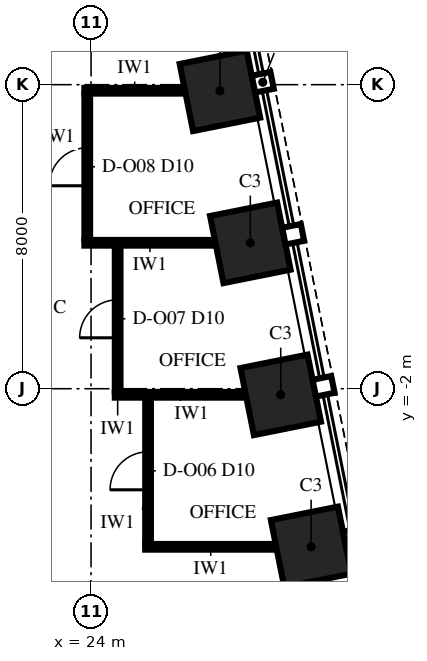
"""IFC4 building model, lengths in metres.
Left out: names, types, materials, properties, quantities, classifications, styles, units other than length and angle.
Written with IfcOpenShell. Run it as: python <this file> out.ifc"""

import sys

from ifc_helpers import new_model, si_unit, direction, frame, frame_2d, origin, origin_2d, place, context, subcontext, project, spatial, rectangle, extrude, element, fill, save


model = new_model("IFC4")
c1 = context("Model", 3, precision=1e-05, world=origin(), true_north=direction((0.0, 1.0)))
c2 = subcontext(c1, "Body", "Model", "MODEL_VIEW")
j1 = project(units=[si_unit("LENGTHUNIT", "METRE"), si_unit("PLANEANGLEUNIT", "RADIAN")], contexts=[c1])
p1 = place(None, origin())
s1 = spatial("IfcSite", under=j1, at=p1, CompositionType="ELEMENT")
p2 = place(p1, origin())
s2 = spatial("IfcBuilding", under=s1, at=p2, CompositionType="ELEMENT")
p3 = place(p2, frame((0.0, 0.0, 163.0)))
s3 = spatial("IfcBuildingStorey", under=s2, at=p3, CompositionType="ELEMENT", Elevation=163.0)
for number, where, z_axis, x_axis in (
    (1, (29.791, -6.162, 0.0), (0.0, 0.0, 1.0), (-0.196, 0.981, 0.0)),
    (2, (28.991, -2.162, 0.0), (0.0, 0.0, 1.0), (-0.196, 0.981, 0.0)),
    (3, (28.191, 1.838, 0.0), (0.0, 0.0, 1.0), (-0.196, 0.981, 0.0)),
    (4, (27.391, 5.838, 0.0), (0.0, 0.0, 1.0), (-0.196, 0.981, 0.0)),
):
    element("IfcColumn", number, at=place(p3, frame(where, z_axis=z_axis, x_axis=x_axis)), inside=s3, PredefinedType="COLUMN", context=c2, shape_type="SweptSolid", body=[
        extrude(rectangle(XDim=1.8, YDim=1.8, at=origin_2d()), origin(), (0.0, 0.0, 1.0), 4.0),
    ])
p4 = place(p3, frame((25.425, -6.16, 0.0), z_axis=(0.0, 0.0, 1.0), x_axis=(1.0, 0.0, 0.0)))
e5 = element("IfcWall", 5, at=p4, inside=s3, PredefinedType="PARTITIONING", context=c2, shape_type="SweptSolid", body=[
    extrude(rectangle(XDim=3.448, YDim=0.15, at=frame_2d((1.724, 0.0))), origin(), (0.0, 0.0, 1.0), 2.742),
])
for number, where, z_axis, x_axis in (
    (6, (24.625, -2.16, 0.0), (0.0, 0.0, 1.0), (1.0, 0.0, 0.0)),
    (7, (23.825, 1.84, 0.0), (0.0, 0.0, 1.0), (1.0, 0.0, 0.0)),
):
    element("IfcWall", number, at=place(p3, frame(where, z_axis=z_axis, x_axis=x_axis)), inside=s3, PredefinedType="PARTITIONING", context=c2, shape_type="SweptSolid", body=[
        extrude(rectangle(XDim=3.448, YDim=0.15, at=frame_2d((1.724, 0.0))), origin(), (0.0, 0.0, 1.0), 3.13),
    ])
p5 = place(p3, frame((23.825, 5.84, 0.0), z_axis=(0.0, 0.0, 1.0), x_axis=(1.0, 0.0, 0.0)))
e8 = element("IfcWall", 8, at=p5, inside=s3, PredefinedType="PARTITIONING", context=c2, shape_type="SweptSolid", body=[
    extrude(rectangle(XDim=2.648, YDim=0.15, at=frame_2d((1.324, 0.0))), origin(), (0.0, 0.0, 1.0), 2.742),
])
p6 = place(p3, frame((23.9, 1.915, 0.0), z_axis=(0.0, 0.0, 1.0), x_axis=(0.0, 1.0, 0.0)))
e9 = element("IfcWall", 9, at=p6, inside=s3, PredefinedType="PARTITIONING", context=c2, shape_type="SweptSolid", body=[
    extrude(rectangle(XDim=3.85, YDim=0.15, at=frame_2d((1.925, 0.0))), origin(), (0.0, 0.0, 1.0), 3.75),
])
p7 = place(p6, frame((1.425, 0.0, 0.0)))
e10 = element("IfcOpeningElement", 10, at=p7, cuts=e9, PredefinedType="OPENING", context=c2, shape_type="SweptSolid", body=[
    extrude(rectangle(XDim=1.0, YDim=2.3, at=frame_2d((0.5, 1.15))), frame((0.0, 0.09, 0.0), z_axis=(0.0, -1.0, 0.0), x_axis=(1.0, 0.0, 0.0)), (0.0, 0.0, 1.0), 0.18),
])
p8 = place(p3, frame((24.7, -2.085, 0.0), z_axis=(0.0, 0.0, 1.0), x_axis=(0.0, 1.0, 0.0)))
e11 = element("IfcWall", 11, at=p8, inside=s3, PredefinedType="PARTITIONING", context=c2, shape_type="SweptSolid", body=[
    extrude(rectangle(XDim=3.85, YDim=0.15, at=frame_2d((1.925, 0.0))), origin(), (0.0, 0.0, 1.0), 3.75),
])
p9 = place(p8, frame((1.425, 0.0, 0.0)))
e12 = element("IfcOpeningElement", 12, at=p9, cuts=e11, PredefinedType="OPENING", context=c2, shape_type="SweptSolid", body=[
    extrude(rectangle(XDim=1.0, YDim=2.3, at=frame_2d((0.5, 1.15))), frame((0.0, 0.09, 0.0), z_axis=(0.0, -1.0, 0.0), x_axis=(1.0, 0.0, 0.0)), (0.0, 0.0, 1.0), 0.18),
])
p10 = place(p3, frame((25.5, -6.085, 0.0), z_axis=(0.0, 0.0, 1.0), x_axis=(0.0, 1.0, 0.0)))
e13 = element("IfcWall", 13, at=p10, inside=s3, PredefinedType="PARTITIONING", context=c2, shape_type="SweptSolid", body=[
    extrude(rectangle(XDim=3.85, YDim=0.15, at=frame_2d((1.925, 0.0))), origin(), (0.0, 0.0, 1.0), 2.742),
])
p11 = place(p10, frame((1.425, 0.0, 0.0)))
e14 = element("IfcOpeningElement", 14, at=p11, cuts=e13, PredefinedType="OPENING", context=c2, shape_type="SweptSolid", body=[
    extrude(rectangle(XDim=1.0, YDim=2.3, at=frame_2d((0.5, 1.15))), frame((0.0, 0.09, 0.0), z_axis=(0.0, -1.0, 0.0), x_axis=(1.0, 0.0, 0.0)), (0.0, 0.0, 1.0), 0.18),
])
p12 = place(p11, origin())
e15 = element("IfcDoor", 15, at=p12, inside=s3, OperationType="SINGLE_SWING_LEFT", PredefinedType="DOOR", context=c2, shape_type="SweptSolid", body=[
    extrude(rectangle(XDim=1.0, YDim=2.3, at=frame_2d((0.5, 1.15))), frame((0.0, 0.075, 0.0), z_axis=(0.0, -1.0, 0.0), x_axis=(1.0, 0.0, 0.0)), (0.0, 0.0, 1.0), 0.149),
])
fill(e14, e15)
p13 = place(p9, origin())
e16 = element("IfcDoor", 16, at=p13, inside=s3, OperationType="SINGLE_SWING_LEFT", PredefinedType="DOOR", context=c2, shape_type="SweptSolid", body=[
    extrude(rectangle(XDim=1.0, YDim=2.3, at=frame_2d((0.5, 1.15))), frame((0.0, 0.075, 0.0), z_axis=(0.0, -1.0, 0.0), x_axis=(1.0, 0.0, 0.0)), (0.0, 0.0, 1.0), 0.149),
])
fill(e12, e16)
p14 = place(p7, origin())
e17 = element("IfcDoor", 17, at=p14, inside=s3, OperationType="SINGLE_SWING_LEFT", PredefinedType="DOOR", context=c2, shape_type="SweptSolid", body=[
    extrude(rectangle(XDim=1.0, YDim=2.3, at=frame_2d((0.5, 1.15))), frame((0.0, 0.075, 0.0), z_axis=(0.0, -1.0, 0.0), x_axis=(1.0, 0.0, 0.0)), (0.0, 0.0, 1.0), 0.149),
])
fill(e10, e17)
save(model, sys.argv[1])
